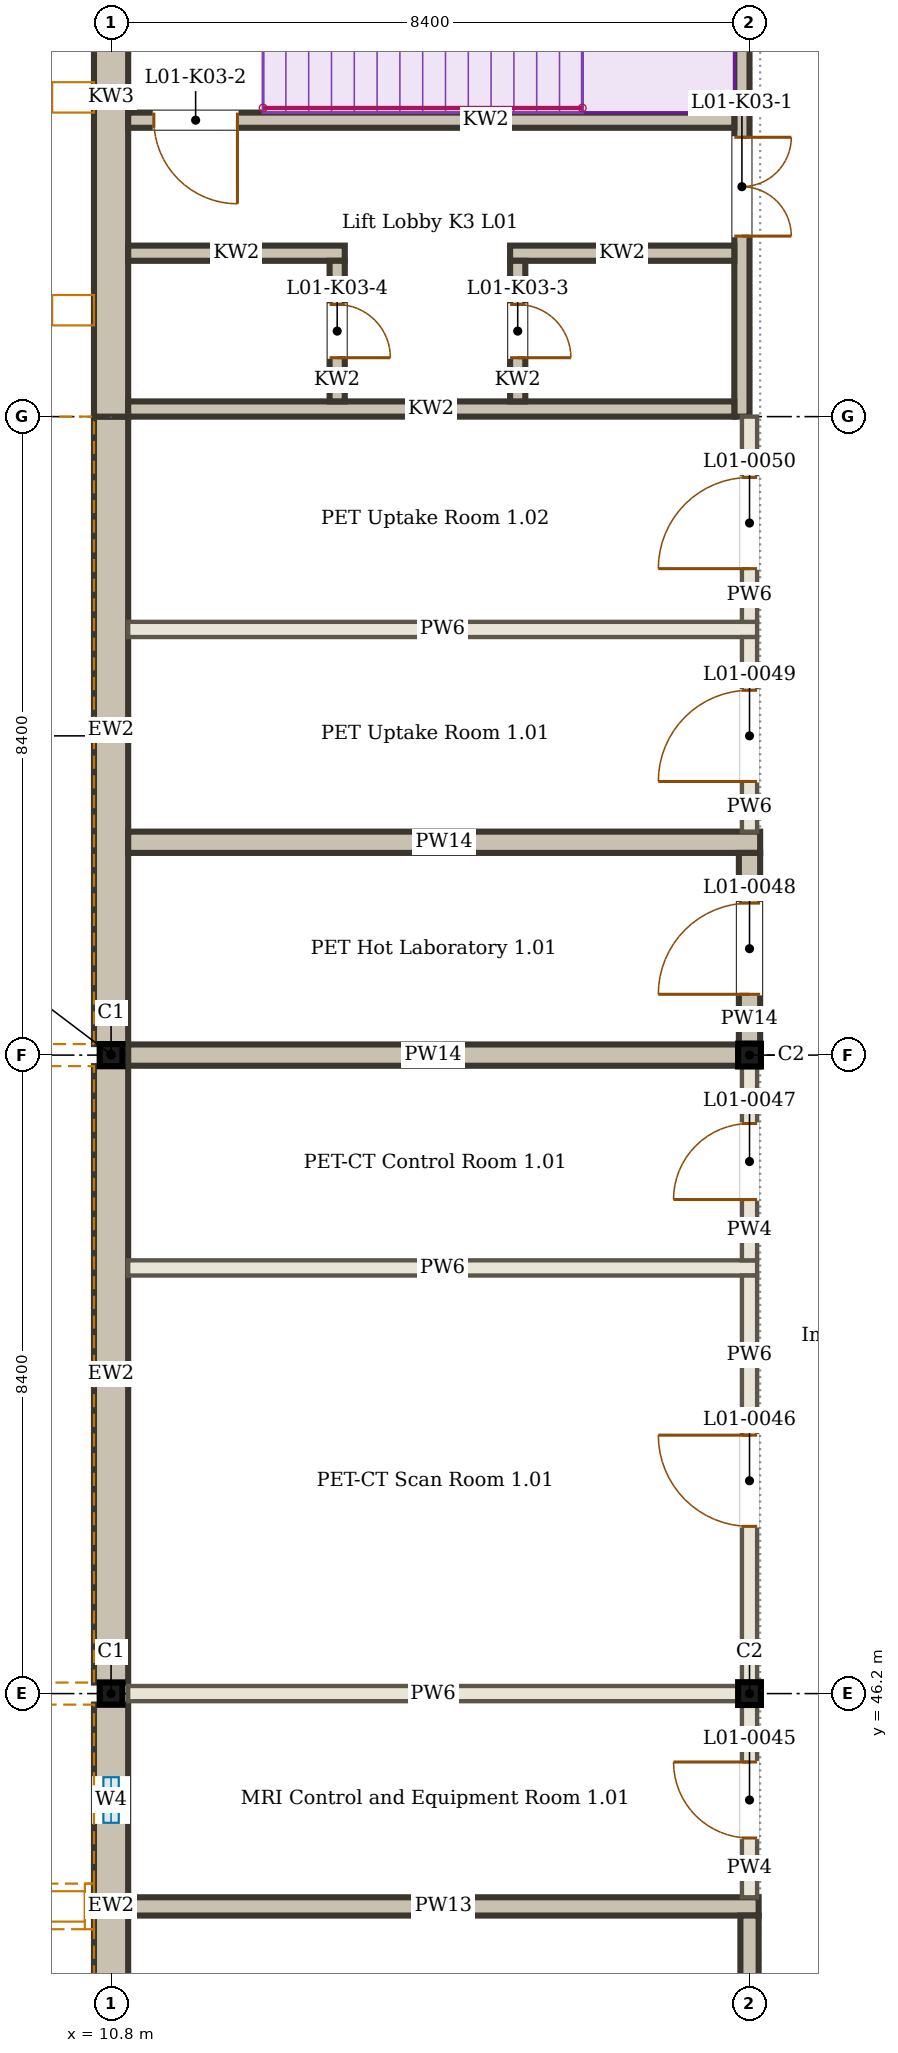
"""IFC4 building model, lengths in metres.
Left out: names, types, materials, properties, quantities, classifications, styles, units other than length and angle.
Written with IfcOpenShell. Run it as: python <this file> out.ifc"""

import sys

from ifc_helpers import new_model, si_unit, direction, frame, frame_2d, origin, origin_2d, place, context, subcontext, project, spatial, rectangle, i_section, extrude, element, fill, save


model = new_model("IFC4")
c1 = context("Model", 3, precision=1e-05, world=origin(), true_north=direction((0.0, 1.0)))
c2 = subcontext(c1, "Body", "Model", "MODEL_VIEW")
j1 = project(units=[si_unit("LENGTHUNIT", "METRE"), si_unit("PLANEANGLEUNIT", "RADIAN")], contexts=[c1])
p1 = place(None, origin())
s1 = spatial("IfcSite", under=j1, at=p1, CompositionType="ELEMENT")
p2 = place(p1, origin())
s2 = spatial("IfcBuilding", under=s1, at=p2, CompositionType="ELEMENT")
p3 = place(p2, frame((0.0, 0.0, 4.5)))
s3 = spatial("IfcBuildingStorey", under=s2, at=p3, CompositionType="ELEMENT", Elevation=4.5)
p4 = place(p3, frame((10.8, 46.2, 0.0), z_axis=(0.0, 0.0, 1.0), x_axis=(1.0, 0.0, 0.0)))
e1 = element("IfcColumn", 1, at=p4, inside=s3, PredefinedType="COLUMN", context=c2, shape_type="SweptSolid", body=[
    extrude(i_section(OverallWidth=0.3, OverallDepth=0.29, WebThickness=0.009, FlangeThickness=0.014, FilletRadius=0.027, at=origin_2d()), origin(), (0.0, 0.0, 1.0), 4.5),
])
p5 = place(p3, frame((19.2, 46.2, 0.0), z_axis=(0.0, 0.0, 1.0), x_axis=(1.0, 0.0, 0.0)))
e2 = element("IfcColumn", 2, at=p5, inside=s3, PredefinedType="COLUMN", context=c2, shape_type="SweptSolid", body=[
    extrude(i_section(OverallWidth=0.3, OverallDepth=0.3, WebThickness=0.011, FlangeThickness=0.019, FilletRadius=0.027, at=origin_2d()), origin(), (0.0, 0.0, 1.0), 4.5),
])
p6 = place(p3, frame((10.8, 54.6, 0.0), z_axis=(0.0, 0.0, 1.0), x_axis=(1.0, 0.0, 0.0)))
e3 = element("IfcColumn", 3, at=p6, inside=s3, PredefinedType="COLUMN", context=c2, shape_type="SweptSolid", body=[
    extrude(i_section(OverallWidth=0.3, OverallDepth=0.29, WebThickness=0.009, FlangeThickness=0.014, FilletRadius=0.027, at=origin_2d()), origin(), (0.0, 0.0, 1.0), 4.5),
])
p7 = place(p3, frame((19.2, 54.6, 0.0), z_axis=(0.0, 0.0, 1.0), x_axis=(1.0, 0.0, 0.0)))
e4 = element("IfcColumn", 4, at=p7, inside=s3, PredefinedType="COLUMN", context=c2, shape_type="SweptSolid", body=[
    extrude(i_section(OverallWidth=0.3, OverallDepth=0.3, WebThickness=0.011, FlangeThickness=0.019, FilletRadius=0.027, at=origin_2d()), origin(), (0.0, 0.0, 1.0), 4.5),
])
p8 = place(p3, frame((10.8, 37.8, 0.0), z_axis=(0.0, 0.0, 1.0), x_axis=(0.0, 1.0, 0.0)))
e5 = element("IfcWall", 5, at=p8, inside=s3, PredefinedType="SOLIDWALL", context=c2, shape_type="SweptSolid", body=[
    extrude(rectangle(XDim=8.255, YDim=0.45, at=frame_2d((4.127, 0.0))), origin(), (0.0, 0.0, 1.0), 4.05),
])
p9 = place(p8, frame((1.1, 0.0, 2.1)))
e6 = element("IfcOpeningElement", 6, at=p9, cuts=e5, PredefinedType="OPENING", context=c2, shape_type="SweptSolid", body=[
    extrude(rectangle(XDim=0.6, YDim=1.2, at=frame_2d((0.3, 0.6))), frame((0.0, 0.235, 0.0), z_axis=(0.0, -1.0, 0.0), x_axis=(1.0, 0.0, 0.0)), (0.0, 0.0, 1.0), 0.47),
])
p10 = place(p8, frame((3.9, 0.0, 2.1)))
e7 = element("IfcOpeningElement", 7, at=p10, cuts=e5, PredefinedType="OPENING", context=c2, shape_type="SweptSolid", body=[
    extrude(rectangle(XDim=0.6, YDim=1.2, at=frame_2d((0.3, 0.6))), frame((0.0, 0.235, 0.0), z_axis=(0.0, -1.0, 0.0), x_axis=(1.0, 0.0, 0.0)), (0.0, 0.0, 1.0), 0.47),
])
p11 = place(p8, frame((6.7, 0.0, 2.1)))
e8 = element("IfcOpeningElement", 8, at=p11, cuts=e5, PredefinedType="OPENING", context=c2, shape_type="SweptSolid", body=[
    extrude(rectangle(XDim=0.6, YDim=1.2, at=frame_2d((0.3, 0.6))), frame((0.0, 0.235, 0.0), z_axis=(0.0, -1.0, 0.0), x_axis=(1.0, 0.0, 0.0)), (0.0, 0.0, 1.0), 0.47),
])
p12 = place(p3, frame((10.8, 46.345, 0.0), z_axis=(0.0, 0.0, 1.0), x_axis=(0.0, 1.0, 0.0)))
e9 = element("IfcWall", 9, at=p12, inside=s3, PredefinedType="SOLIDWALL", context=c2, shape_type="SweptSolid", body=[
    extrude(rectangle(XDim=8.11, YDim=0.45, at=frame_2d((4.055, 0.0))), origin(), (0.0, 0.0, 1.0), 4.05),
])
p13 = place(p3, frame((10.8, 54.745, 0.0), z_axis=(0.0, 0.0, 1.0), x_axis=(0.0, 1.0, 0.0)))
e10 = element("IfcWall", 10, at=p13, inside=s3, PredefinedType="SOLIDWALL", context=c2, shape_type="SweptSolid", body=[
    extrude(rectangle(XDim=8.255, YDim=0.45, at=frame_2d((4.127, 0.0))), origin(), (0.0, 0.0, 1.0), 4.05),
])
p14 = place(p3, frame((11.025, 43.4, 0.0), z_axis=(0.0, 0.0, 1.0), x_axis=(1.0, 0.0, 0.0)))
e11 = element("IfcWall", 11, at=p14, inside=s3, PredefinedType="SOLIDWALL", context=c2, shape_type="SweptSolid", body=[
    extrude(rectangle(XDim=8.295, YDim=0.24, at=frame_2d((4.147, 0.0))), origin(), (0.0, 0.0, 1.0), 4.1),
])
p15 = place(p3, frame((11.025, 46.2, 0.0), z_axis=(0.0, 0.0, 1.0), x_axis=(1.0, 0.0, 0.0)))
e12 = element("IfcWall", 12, at=p15, inside=s3, PredefinedType="PARTITIONING", context=c2, shape_type="SweptSolid", body=[
    extrude(rectangle(XDim=8.025, YDim=0.2, at=frame_2d((4.013, 0.0))), origin(), (0.0, 0.0, 1.0), 4.044),
])
p16 = place(p3, frame((11.025, 51.8, 0.0), z_axis=(0.0, 0.0, 1.0), x_axis=(1.0, 0.0, 0.0)))
e13 = element("IfcWall", 13, at=p16, inside=s3, PredefinedType="PARTITIONING", context=c2, shape_type="SweptSolid", body=[
    extrude(rectangle(XDim=8.275, YDim=0.2, at=frame_2d((4.138, 0.0))), origin(), (0.0, 0.0, 1.0), 4.1),
])
p17 = place(p3, frame((11.025, 54.6, 0.0), z_axis=(0.0, 0.0, 1.0), x_axis=(1.0, 0.0, 0.0)))
e14 = element("IfcWall", 14, at=p17, inside=s3, PredefinedType="SOLIDWALL", context=c2, shape_type="SweptSolid", body=[
    extrude(rectangle(XDim=8.025, YDim=0.28, at=frame_2d((4.013, 0.0))), origin(), (0.0, 0.0, 1.0), 4.044),
])
p18 = place(p3, frame((11.025, 57.4, 0.0), z_axis=(0.0, 0.0, 1.0), x_axis=(1.0, 0.0, 0.0)))
e15 = element("IfcWall", 15, at=p18, inside=s3, PredefinedType="SOLIDWALL", context=c2, shape_type="SweptSolid", body=[
    extrude(rectangle(XDim=8.315, YDim=0.28, at=frame_2d((4.158, 0.0))), origin(), (0.0, 0.0, 1.0), 4.1),
])
p19 = place(p3, frame((11.025, 60.2, 0.0), z_axis=(0.0, 0.0, 1.0), x_axis=(1.0, 0.0, 0.0)))
e16 = element("IfcWall", 16, at=p19, inside=s3, PredefinedType="PARTITIONING", context=c2, shape_type="SweptSolid", body=[
    extrude(rectangle(XDim=8.275, YDim=0.2, at=frame_2d((4.138, 0.0))), origin(), (0.0, 0.0, 1.0), 4.1),
])
p20 = place(p3, frame((19.2, 37.8, 0.0), z_axis=(0.0, 0.0, 1.0), x_axis=(0.0, 1.0, 0.0)))
e17 = element("IfcWall", 17, at=p20, inside=s3, PredefinedType="SOLIDWALL", context=c2, shape_type="SweptSolid", body=[
    extrude(rectangle(XDim=5.48, YDim=0.24, at=frame_2d((2.74, 0.0))), origin(), (0.0, 0.0, 1.0), 4.044),
])
p21 = place(p20, frame((2.2, 0.0, 0.0)))
e18 = element("IfcOpeningElement", 18, at=p21, cuts=e17, PredefinedType="OPENING", context=c2, shape_type="SweptSolid", body=[
    extrude(rectangle(XDim=1.2, YDim=2.1, at=frame_2d((0.6, 1.05))), frame((0.0, 0.13, 0.0), z_axis=(0.0, -1.0, 0.0), x_axis=(1.0, 0.0, 0.0)), (0.0, 0.0, 1.0), 0.26),
])
p22 = place(p3, frame((19.2, 43.52, 0.0), z_axis=(0.0, 0.0, 1.0), x_axis=(0.0, 1.0, 0.0)))
e19 = element("IfcWall", 19, at=p22, inside=s3, PredefinedType="PARTITIONING", context=c2, shape_type="SweptSolid", body=[
    extrude(rectangle(XDim=2.53, YDim=0.2, at=frame_2d((1.265, 0.0))), origin(), (0.0, 0.0, 1.0), 4.1),
])
p23 = place(p22, frame((0.78, 0.0, 0.0)))
e20 = element("IfcOpeningElement", 20, at=p23, cuts=e19, PredefinedType="OPENING", context=c2, shape_type="SweptSolid", body=[
    extrude(rectangle(XDim=1.0, YDim=2.1, at=frame_2d((0.5, 1.05))), frame((0.0, 0.11, 0.0), z_axis=(0.0, -1.0, 0.0), x_axis=(1.0, 0.0, 0.0)), (0.0, 0.0, 1.0), 0.22),
])
p24 = place(p3, frame((19.2, 46.35, 0.0), z_axis=(0.0, 0.0, 1.0), x_axis=(0.0, 1.0, 0.0)))
e21 = element("IfcWall", 21, at=p24, inside=s3, PredefinedType="PARTITIONING", context=c2, shape_type="SweptSolid", body=[
    extrude(rectangle(XDim=5.35, YDim=0.2, at=frame_2d((2.675, 0.0))), origin(), (0.0, 0.0, 1.0), 4.1),
])
p25 = place(p24, frame((2.05, 0.0, 0.0)))
e22 = element("IfcOpeningElement", 22, at=p25, cuts=e21, PredefinedType="OPENING", context=c2, shape_type="SweptSolid", body=[
    extrude(rectangle(XDim=1.2, YDim=2.1, at=frame_2d((0.6, 1.05))), frame((0.0, 0.11, 0.0), z_axis=(0.0, -1.0, 0.0), x_axis=(1.0, 0.0, 0.0)), (0.0, 0.0, 1.0), 0.22),
])
p26 = place(p3, frame((19.2, 51.9, 0.0), z_axis=(0.0, 0.0, 1.0), x_axis=(0.0, 1.0, 0.0)))
e23 = element("IfcWall", 23, at=p26, inside=s3, PredefinedType="PARTITIONING", context=c2, shape_type="SweptSolid", body=[
    extrude(rectangle(XDim=2.55, YDim=0.2, at=frame_2d((1.275, 0.0))), origin(), (0.0, 0.0, 1.0), 4.1),
])
p27 = place(p26, frame((0.8, 0.0, 0.0)))
e24 = element("IfcOpeningElement", 24, at=p27, cuts=e23, PredefinedType="OPENING", context=c2, shape_type="SweptSolid", body=[
    extrude(rectangle(XDim=1.0, YDim=2.1, at=frame_2d((0.5, 1.05))), frame((0.0, 0.11, 0.0), z_axis=(0.0, -1.0, 0.0), x_axis=(1.0, 0.0, 0.0)), (0.0, 0.0, 1.0), 0.22),
])
p28 = place(p3, frame((19.2, 54.75, 0.0), z_axis=(0.0, 0.0, 1.0), x_axis=(0.0, 1.0, 0.0)))
e25 = element("IfcWall", 25, at=p28, inside=s3, PredefinedType="SOLIDWALL", context=c2, shape_type="SweptSolid", body=[
    extrude(rectangle(XDim=2.51, YDim=0.28, at=frame_2d((1.255, 0.0))), origin(), (0.0, 0.0, 1.0), 4.1),
])
p29 = place(p28, frame((0.65, 0.0, 0.0)))
e26 = element("IfcOpeningElement", 26, at=p29, cuts=e25, PredefinedType="OPENING", context=c2, shape_type="SweptSolid", body=[
    extrude(rectangle(XDim=1.2, YDim=2.1, at=frame_2d((0.6, 1.05))), frame((0.0, 0.15, 0.0), z_axis=(0.0, -1.0, 0.0), x_axis=(1.0, 0.0, 0.0)), (0.0, 0.0, 1.0), 0.3),
])
p30 = place(p3, frame((19.2, 57.54, 0.0), z_axis=(0.0, 0.0, 1.0), x_axis=(0.0, 1.0, 0.0)))
e27 = element("IfcWall", 27, at=p30, inside=s3, PredefinedType="PARTITIONING", context=c2, shape_type="SweptSolid", body=[
    extrude(rectangle(XDim=2.56, YDim=0.2, at=frame_2d((1.28, 0.0))), origin(), (0.0, 0.0, 1.0), 4.1),
])
p31 = place(p30, frame((0.66, 0.0, 0.0)))
e28 = element("IfcOpeningElement", 28, at=p31, cuts=e27, PredefinedType="OPENING", context=c2, shape_type="SweptSolid", body=[
    extrude(rectangle(XDim=1.2, YDim=2.1, at=frame_2d((0.6, 1.05))), frame((0.0, 0.11, 0.0), z_axis=(0.0, -1.0, 0.0), x_axis=(1.0, 0.0, 0.0)), (0.0, 0.0, 1.0), 0.22),
])
p32 = place(p3, frame((19.2, 60.3, 0.0), z_axis=(0.0, 0.0, 1.0), x_axis=(0.0, 1.0, 0.0)))
e29 = element("IfcWall", 29, at=p32, inside=s3, PredefinedType="PARTITIONING", context=c2, shape_type="SweptSolid", body=[
    extrude(rectangle(XDim=2.7, YDim=0.2, at=frame_2d((1.35, 0.0))), origin(), (0.0, 0.0, 1.0), 4.044),
])
p33 = place(p32, frame((0.7, 0.0, 0.0)))
e30 = element("IfcOpeningElement", 30, at=p33, cuts=e29, PredefinedType="OPENING", context=c2, shape_type="SweptSolid", body=[
    extrude(rectangle(XDim=1.2, YDim=2.1, at=frame_2d((0.6, 1.05))), frame((0.0, 0.11, 0.0), z_axis=(0.0, -1.0, 0.0), x_axis=(1.0, 0.0, 0.0)), (0.0, 0.0, 1.0), 0.22),
])
p34 = place(p3, frame((19.1, 71.4, 0.0), z_axis=(0.0, 0.0, 1.0), x_axis=(0.0, -1.0, 0.0)))
e31 = element("IfcWall", 31, at=p34, inside=s3, PredefinedType="SOLIDWALL", context=c2, shape_type="SweptSolid", body=[
    extrude(rectangle(XDim=8.4, YDim=0.2, at=frame_2d((4.2, 0.0))), origin(), (0.0, 0.0, 1.0), 4.5),
])
p35 = place(p34, frame((4.725, 0.0, 0.0)))
e32 = element("IfcOpeningElement", 32, at=p35, cuts=e31, PredefinedType="OPENING", context=c2, shape_type="SweptSolid", body=[
    extrude(rectangle(XDim=1.3, YDim=2.1, at=frame_2d((0.65, 1.05))), frame((0.0, 0.11, 0.0), z_axis=(0.0, -1.0, 0.0), x_axis=(1.0, 0.0, 0.0)), (0.0, 0.0, 1.0), 0.22),
])
p36 = place(p3, frame((10.8, 71.4, 0.0), z_axis=(0.0, 0.0, 1.0), x_axis=(0.0, -1.0, 0.0)))
e33 = element("IfcWall", 33, at=p36, inside=s3, PredefinedType="SOLIDWALL", context=c2, shape_type="SweptSolid", body=[
    extrude(rectangle(XDim=8.4, YDim=0.45, at=frame_2d((4.2, 0.0))), origin(), (0.0, 0.0, 1.0), 4.5),
])
p37 = place(p3, frame((19.0, 63.1, 0.0), z_axis=(0.0, 0.0, 1.0), x_axis=(-1.0, 0.0, 0.0)))
e34 = element("IfcWall", 34, at=p37, inside=s3, PredefinedType="SOLIDWALL", context=c2, shape_type="SweptSolid", body=[
    extrude(rectangle(XDim=7.975, YDim=0.2, at=frame_2d((3.988, 0.0))), origin(), (0.0, 0.0, 1.0), 4.5),
])
p38 = place(p3, frame((19.0, 66.9, 0.0), z_axis=(0.0, 0.0, 1.0), x_axis=(-1.0, 0.0, 0.0)))
e35 = element("IfcWall", 35, at=p38, inside=s3, PredefinedType="SOLIDWALL", context=c2, shape_type="SweptSolid", body=[
    extrude(rectangle(XDim=7.975, YDim=0.2, at=frame_2d((3.988, 0.0))), origin(), (0.0, 0.0, 1.0), 4.5),
])
p39 = place(p38, frame((6.538, 0.0, 0.0)))
e36 = element("IfcOpeningElement", 36, at=p39, cuts=e35, PredefinedType="OPENING", context=c2, shape_type="SweptSolid", body=[
    extrude(rectangle(XDim=1.1, YDim=2.1, at=frame_2d((0.55, 1.05))), frame((0.0, 0.11, 0.0), z_axis=(0.0, -1.0, 0.0), x_axis=(1.0, 0.0, 0.0)), (0.0, 0.0, 1.0), 0.22),
])
p40 = place(p3, frame((19.0, 65.15, 0.0), z_axis=(0.0, 0.0, 1.0), x_axis=(-1.0, 0.0, 0.0)))
e37 = element("IfcWall", 37, at=p40, inside=s3, PredefinedType="SOLIDWALL", context=c2, shape_type="SweptSolid", body=[
    extrude(rectangle(XDim=2.95, YDim=0.2, at=frame_2d((1.475, 0.0))), origin(), (0.0, 0.0, 1.0), 4.3),
])
p41 = place(p3, frame((13.875, 65.15, 0.0), z_axis=(0.0, 0.0, 1.0), x_axis=(-1.0, 0.0, 0.0)))
e38 = element("IfcWall", 38, at=p41, inside=s3, PredefinedType="SOLIDWALL", context=c2, shape_type="SweptSolid", body=[
    extrude(rectangle(XDim=2.85, YDim=0.2, at=frame_2d((1.425, 0.0))), origin(), (0.0, 0.0, 1.0), 4.3),
])
p42 = place(p3, frame((16.15, 65.05, 0.0), z_axis=(0.0, 0.0, 1.0), x_axis=(0.0, -1.0, 0.0)))
e39 = element("IfcWall", 39, at=p42, inside=s3, PredefinedType="SOLIDWALL", context=c2, shape_type="SweptSolid", body=[
    extrude(rectangle(XDim=1.85, YDim=0.2, at=frame_2d((0.925, 0.0))), origin(), (0.0, 0.0, 1.0), 4.3),
])
p43 = place(p42, frame((0.575, 0.0, 0.0)))
e40 = element("IfcOpeningElement", 40, at=p43, cuts=e39, PredefinedType="OPENING", context=c2, shape_type="SweptSolid", body=[
    extrude(rectangle(XDim=0.7, YDim=2.1, at=frame_2d((0.35, 1.05))), frame((0.0, 0.11, 0.0), z_axis=(0.0, -1.0, 0.0), x_axis=(1.0, 0.0, 0.0)), (0.0, 0.0, 1.0), 0.22),
])
p44 = place(p3, frame((13.775, 65.05, 0.0), z_axis=(0.0, 0.0, 1.0), x_axis=(0.0, -1.0, 0.0)))
e41 = element("IfcWall", 41, at=p44, inside=s3, PredefinedType="SOLIDWALL", context=c2, shape_type="SweptSolid", body=[
    extrude(rectangle(XDim=1.85, YDim=0.2, at=frame_2d((0.925, 0.0))), origin(), (0.0, 0.0, 1.0), 4.3),
])
p45 = place(p44, frame((0.575, 0.0, 0.0)))
e42 = element("IfcOpeningElement", 42, at=p45, cuts=e41, PredefinedType="OPENING", context=c2, shape_type="SweptSolid", body=[
    extrude(rectangle(XDim=0.7, YDim=2.1, at=frame_2d((0.35, 1.05))), frame((0.0, 0.11, 0.0), z_axis=(0.0, -1.0, 0.0), x_axis=(1.0, 0.0, 0.0)), (0.0, 0.0, 1.0), 0.22),
])
p46 = place(p11, origin())
e43 = element("IfcWindow", 43, at=p46, inside=s3, PartitioningType="SINGLE_PANEL", PredefinedType="WINDOW", context=c2, shape_type="SweptSolid", body=[
    extrude(rectangle(XDim=0.6, YDim=1.2, at=frame_2d((0.3, 0.6))), frame((0.0, -0.075, 0.0), z_axis=(0.0, -1.0, 0.0), x_axis=(1.0, 0.0, 0.0)), (0.0, 0.0, 1.0), 0.06),
])
fill(e8, e43)
p47 = place(p23, origin())
e44 = element("IfcDoor", 44, at=p47, inside=s3, OperationType="SINGLE_SWING_RIGHT", PredefinedType="DOOR", context=c2, shape_type="SweptSolid", body=[
    extrude(rectangle(XDim=1.0, YDim=2.1, at=frame_2d((0.5, 1.05))), frame((0.0, 0.025, 0.0), z_axis=(0.0, -1.0, 0.0), x_axis=(1.0, 0.0, 0.0)), (0.0, 0.0, 1.0), 0.05),
])
fill(e20, e44)
p48 = place(p25, origin())
e45 = element("IfcDoor", 45, at=p48, inside=s3, OperationType="SINGLE_SWING_RIGHT", PredefinedType="DOOR", context=c2, shape_type="SweptSolid", body=[
    extrude(rectangle(XDim=1.2, YDim=2.1, at=frame_2d((0.6, 1.05))), frame((0.0, 0.025, 0.0), z_axis=(0.0, -1.0, 0.0), x_axis=(1.0, 0.0, 0.0)), (0.0, 0.0, 1.0), 0.05),
])
fill(e22, e45)
p49 = place(p27, origin())
e46 = element("IfcDoor", 46, at=p49, inside=s3, OperationType="SINGLE_SWING_LEFT", PredefinedType="DOOR", context=c2, shape_type="SweptSolid", body=[
    extrude(rectangle(XDim=1.0, YDim=2.1, at=frame_2d((0.5, 1.05))), frame((0.0, 0.025, 0.0), z_axis=(0.0, -1.0, 0.0), x_axis=(1.0, 0.0, 0.0)), (0.0, 0.0, 1.0), 0.05),
])
fill(e24, e46)
p50 = place(p29, origin())
e47 = element("IfcDoor", 47, at=p50, inside=s3, OperationType="SINGLE_SWING_LEFT", PredefinedType="DOOR", context=c2, shape_type="SweptSolid", body=[
    extrude(rectangle(XDim=1.2, YDim=2.1, at=frame_2d((0.6, 1.05))), frame((0.0, 0.025, 0.0), z_axis=(0.0, -1.0, 0.0), x_axis=(1.0, 0.0, 0.0)), (0.0, 0.0, 1.0), 0.05),
])
fill(e26, e47)
p51 = place(p31, origin())
e48 = element("IfcDoor", 48, at=p51, inside=s3, OperationType="SINGLE_SWING_LEFT", PredefinedType="DOOR", context=c2, shape_type="SweptSolid", body=[
    extrude(rectangle(XDim=1.2, YDim=2.1, at=frame_2d((0.6, 1.05))), frame((0.0, 0.025, 0.0), z_axis=(0.0, -1.0, 0.0), x_axis=(1.0, 0.0, 0.0)), (0.0, 0.0, 1.0), 0.05),
])
fill(e28, e48)
p52 = place(p33, origin())
e49 = element("IfcDoor", 49, at=p52, inside=s3, OperationType="SINGLE_SWING_LEFT", PredefinedType="DOOR", context=c2, shape_type="SweptSolid", body=[
    extrude(rectangle(XDim=1.2, YDim=2.1, at=frame_2d((0.6, 1.05))), frame((0.0, 0.025, 0.0), z_axis=(0.0, -1.0, 0.0), x_axis=(1.0, 0.0, 0.0)), (0.0, 0.0, 1.0), 0.05),
])
fill(e30, e49)
p53 = place(p35, origin())
e50 = element("IfcDoor", 50, at=p53, inside=s3, OperationType="DOUBLE_DOOR_DOUBLE_SWING", PredefinedType="DOOR", context=c2, shape_type="SweptSolid", body=[
    extrude(rectangle(XDim=1.3, YDim=2.1, at=frame_2d((0.65, 1.05))), frame((0.0, 0.025, 0.0), z_axis=(0.0, -1.0, 0.0), x_axis=(1.0, 0.0, 0.0)), (0.0, 0.0, 1.0), 0.05),
])
fill(e32, e50)
p54 = place(p39, origin())
e51 = element("IfcDoor", 51, at=p54, inside=s3, OperationType="SINGLE_SWING_LEFT", PredefinedType="DOOR", context=c2, shape_type="SweptSolid", body=[
    extrude(rectangle(XDim=1.1, YDim=2.1, at=frame_2d((0.55, 1.05))), frame((0.0, 0.025, 0.0), z_axis=(0.0, -1.0, 0.0), x_axis=(1.0, 0.0, 0.0)), (0.0, 0.0, 1.0), 0.05),
])
fill(e36, e51)
p55 = place(p43, origin())
e52 = element("IfcDoor", 52, at=p55, inside=s3, OperationType="SINGLE_SWING_RIGHT", PredefinedType="DOOR", context=c2, shape_type="SweptSolid", body=[
    extrude(rectangle(XDim=0.7, YDim=2.1, at=frame_2d((0.35, 1.05))), frame((0.0, 0.025, 0.0), z_axis=(0.0, -1.0, 0.0), x_axis=(1.0, 0.0, 0.0)), (0.0, 0.0, 1.0), 0.05),
])
fill(e40, e52)
p56 = place(p45, origin())
e53 = element("IfcDoor", 53, at=p56, inside=s3, OperationType="SINGLE_SWING_RIGHT", PredefinedType="DOOR", context=c2, shape_type="SweptSolid", body=[
    extrude(rectangle(XDim=0.7, YDim=2.1, at=frame_2d((0.35, 1.05))), frame((0.0, 0.025, 0.0), z_axis=(0.0, -1.0, 0.0), x_axis=(1.0, 0.0, 0.0)), (0.0, 0.0, 1.0), 0.05),
])
fill(e42, e53)
save(model, sys.argv[1])
